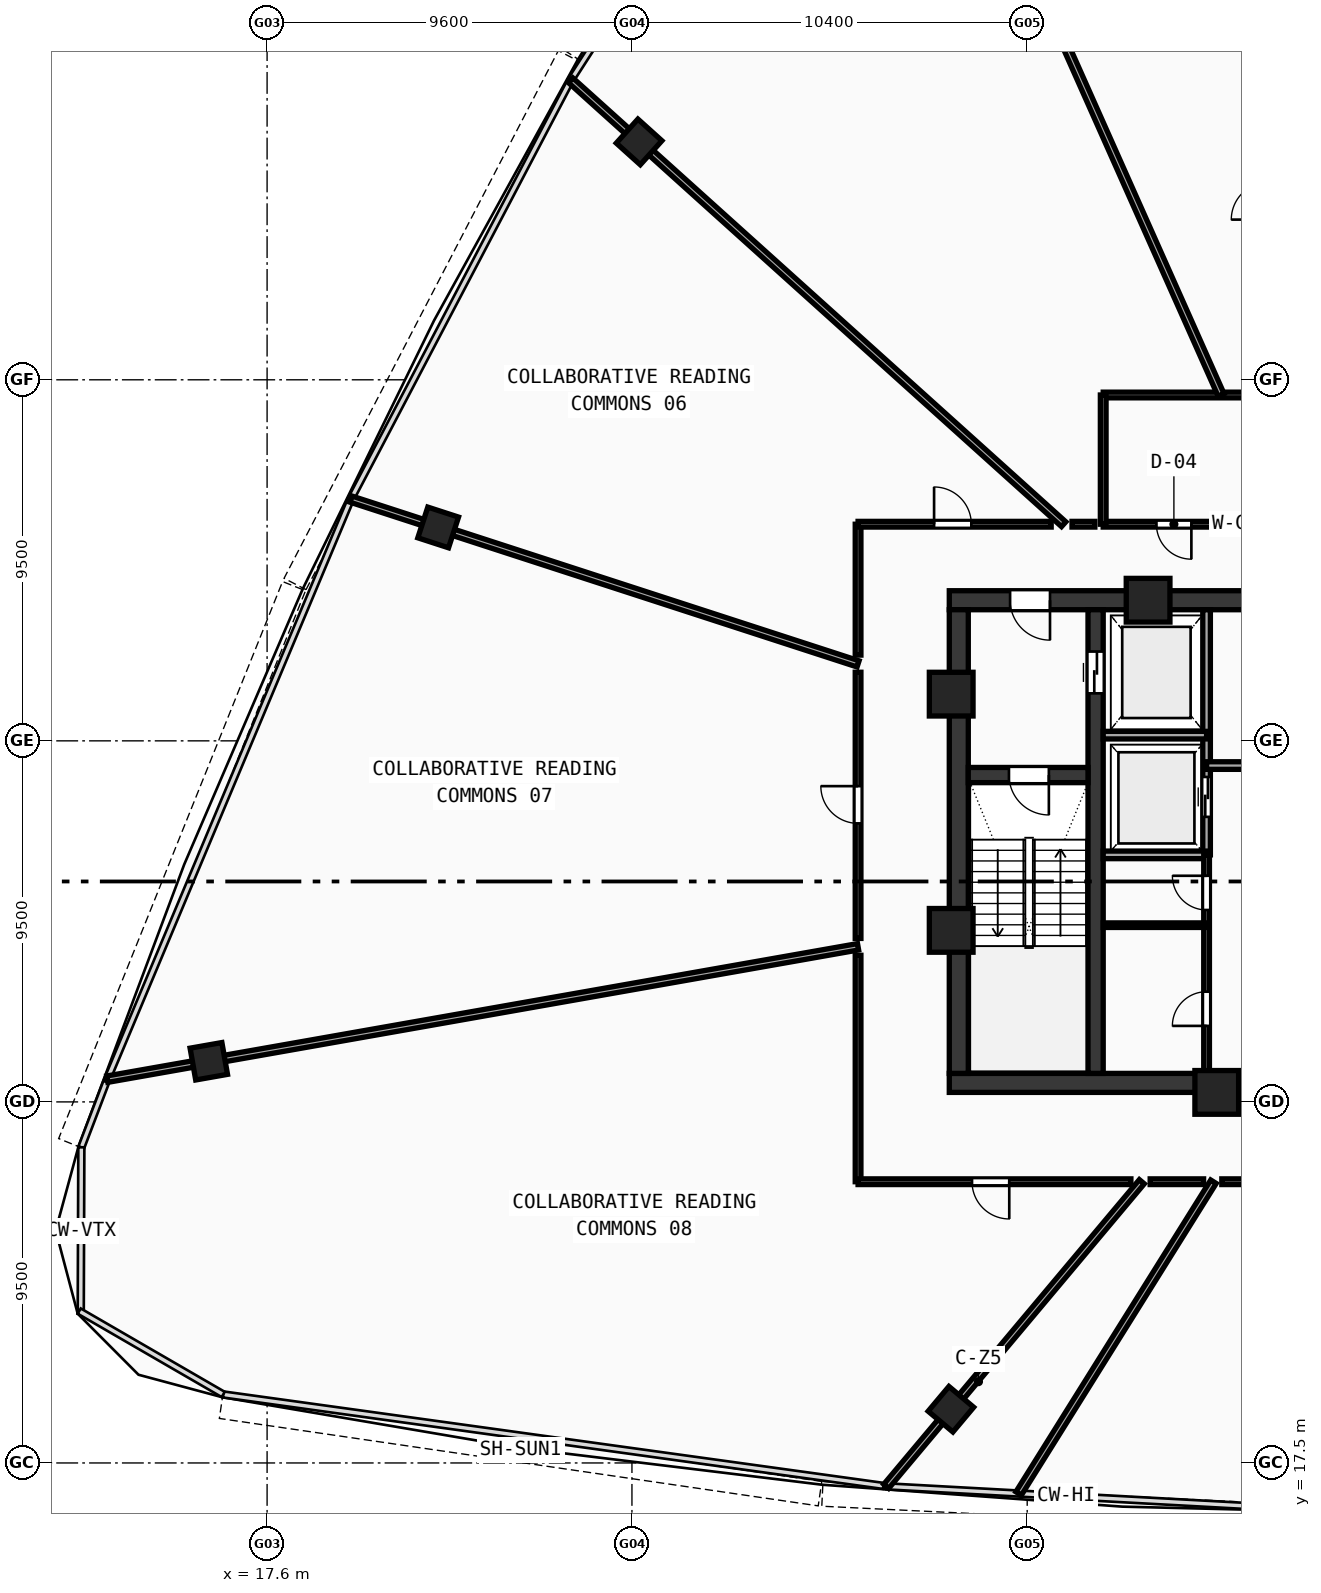
"""IFC4 building model, lengths in metres.
Left out: names, types, materials, properties, quantities, classifications, styles, units other than length and angle.
Written with IfcOpenShell. Run it as: python <this file> out.ifc"""

import sys

from ifc_helpers import new_model, si_unit, direction, frame, frame_2d, origin, origin_with_axes, origin_2d, place, context, subcontext, project, spatial, rectangle, hollow_rectangle, extrude, source, transform, mapped, element, fill, save


model = new_model("IFC4")
c1 = context("Model", 3, precision=1e-05, world=origin(), true_north=direction((0.0, 1.0)))
c2 = subcontext(c1, "Body", "Model", "MODEL_VIEW")
j1 = project(units=[si_unit("LENGTHUNIT", "METRE"), si_unit("PLANEANGLEUNIT", "RADIAN")], contexts=[c1])
p1 = place(None, origin())
s1 = spatial("IfcSite", under=j1, at=p1, CompositionType="ELEMENT")
p2 = place(p1, origin())
s2 = spatial("IfcBuilding", under=s1, at=p2, CompositionType="ELEMENT")
p3 = place(p2, frame((0.0, 0.0, 244.53)))
s3 = spatial("IfcBuildingStorey", under=s2, at=p3, CompositionType="ELEMENT", Elevation=244.53)
p4 = place(p3, frame((35.55, 27.5, 0.0), z_axis=(0.0, 0.0, 1.0), x_axis=(1.0, 0.0, 0.0)))
e1 = element("IfcWall", 1, at=p4, inside=s3, PredefinedType="SHEAR", context=c2, shape_type="SweptSolid", body=[
    extrude(rectangle(XDim=24.9, YDim=0.5, at=frame_2d((12.45, 0.0))), origin(), (0.0, 0.0, 1.0), 3.47),
])
p5 = place(p3, frame((35.55, 40.2, 0.0), z_axis=(0.0, 0.0, 1.0), x_axis=(1.0, 0.0, 0.0)))
e2 = element("IfcWall", 2, at=p5, inside=s3, PredefinedType="SHEAR", context=c2, shape_type="SweptSolid", body=[
    extrude(rectangle(XDim=11.25, YDim=0.5, at=frame_2d((5.625, 0.0))), origin(), (0.0, 0.0, 1.0), 3.47),
])
p6 = place(p5, frame((1.6, 0.0, 0.0)))
e3 = element("IfcOpeningElement", 3, at=p6, cuts=e2, PredefinedType="OPENING", context=c2, shape_type="SweptSolid", body=[
    extrude(rectangle(XDim=1.05, YDim=2.1, at=frame_2d((0.525, 1.05))), frame((0.0, 0.26, 0.0), z_axis=(0.0, -1.0, 0.0), x_axis=(1.0, 0.0, 0.0)), (0.0, 0.0, 1.0), 0.52),
])
p7 = place(p3, frame((35.8, 27.75, 0.0), z_axis=(0.0, 0.0, 1.0), x_axis=(0.0, 1.0, 0.0)))
e4 = element("IfcWall", 4, at=p7, inside=s3, PredefinedType="SHEAR", context=c2, shape_type="SweptSolid", body=[
    extrude(rectangle(XDim=12.2, YDim=0.5, at=frame_2d((6.1, 0.0))), origin(), (0.0, 0.0, 1.0), 3.47),
])
p8 = place(p3, frame((39.4, 27.75, 0.0), z_axis=(0.0, 0.0, 1.0), x_axis=(0.0, 1.0, 0.0)))
e5 = element("IfcWall", 5, at=p8, inside=s3, PredefinedType="SHEAR", context=c2, shape_type="SweptSolid", body=[
    extrude(rectangle(XDim=12.2, YDim=0.4, at=frame_2d((6.1, 0.0))), origin(), (0.0, 0.0, 1.0), 3.47),
])
p9 = place(p8, frame((10.0, 0.0, 0.0)))
e6 = element("IfcOpeningElement", 6, at=p9, cuts=e5, PredefinedType="OPENING", context=c2, shape_type="SweptSolid", body=[
    extrude(rectangle(XDim=1.1, YDim=2.1, at=frame_2d((0.55, 1.05))), frame((0.0, 0.21, 0.0), z_axis=(0.0, -1.0, 0.0), x_axis=(1.0, 0.0, 0.0)), (0.0, 0.0, 1.0), 0.42),
])
p10 = place(p3, frame((36.05, 35.6, 0.0), z_axis=(0.0, 0.0, 1.0), x_axis=(1.0, 0.0, 0.0)))
e7 = element("IfcWall", 7, at=p10, inside=s3, PredefinedType="SHEAR", context=c2, shape_type="SweptSolid", body=[
    extrude(rectangle(XDim=3.15, YDim=0.4, at=frame_2d((1.575, 0.0))), origin(), (0.0, 0.0, 1.0), 3.47),
])
p11 = place(p10, frame((1.07, 0.0, 0.0)))
e8 = element("IfcOpeningElement", 8, at=p11, cuts=e7, PredefinedType="OPENING", context=c2, shape_type="SweptSolid", body=[
    extrude(rectangle(XDim=1.05, YDim=2.1, at=frame_2d((0.525, 1.05))), frame((0.0, 0.21, 0.0), z_axis=(0.0, -1.0, 0.0), x_axis=(1.0, 0.0, 0.0)), (0.0, 0.0, 1.0), 0.42),
])
m1 = source(origin(), c2, "Body", "SweptSolid", [
    extrude(hollow_rectangle(XDim=1.15, YDim=1.15, WallThickness=0.048, at=origin_2d()), origin(), (0.0, 0.0, 1.0), 3.73),
])
for number, where, z_axis, x_axis in (
    (9, (42.588, 27.25, -0.26), (0.0, 0.0, 1.0), (1.0, 0.0, 0.0)),
    (10, (40.781, 40.2, -0.26), (0.0, 0.0, 1.0), (1.0, 0.0, 0.0)),
    (11, (35.6, 37.729, -0.26), (0.0, 0.0, 1.0), (1.0, 0.0, 0.0)),
    (12, (35.6, 31.513, -0.26), (0.0, 0.0, 1.0), (1.0, 0.0, 0.0)),
):
    element("IfcColumn", number, at=place(p3, frame(where, z_axis=z_axis, x_axis=x_axis)), inside=s3, PredefinedType="COLUMN", context=c2, shape_type="MappedRepresentation", body=[
        mapped(m1, transform((0.0, 0.0, 0.0), scale=1.0)),
    ])
m2 = source(origin(), c2, "Body", "SweptSolid", [
    extrude(hollow_rectangle(XDim=0.85, YDim=0.85, WallThickness=0.034, at=origin_2d()), origin(), (0.0, 0.0, 1.0), 3.73),
])
for number, where, z_axis, x_axis in (
    (13, (35.593, 18.914, -0.26), (0.0, 0.0, 1.0), (0.766, -0.643, 0.0)),
    (14, (27.388, 52.259, -0.26), (0.0, 0.0, 1.0), (-0.669, -0.743, 0.0)),
    (15, (22.102, 42.115, -0.26), (0.0, 0.0, 1.0), (-0.309, -0.951, 0.0)),
    (16, (16.066, 28.069, -0.26), (0.0, 0.0, 1.0), (0.174, -0.985, 0.0)),
):
    element("IfcColumn", number, at=place(p3, frame(where, z_axis=z_axis, x_axis=x_axis)), inside=s3, PredefinedType="COLUMN", context=c2, shape_type="MappedRepresentation", body=[
        mapped(m2, transform((0.0, 0.0, 0.0), scale=1.0)),
    ])
p12 = place(p3, frame((42.32, 33.5, 0.0), z_axis=(0.0, 0.0, 1.0), x_axis=(0.0, 1.0, 0.0)))
e17 = element("IfcWall", 17, at=p12, inside=s3, PredefinedType="SOLIDWALL", context=c2, shape_type="SweptSolid", body=[
    extrude(rectangle(XDim=6.45, YDim=0.2, at=frame_2d((3.225, 0.0))), origin(), (0.0, 0.0, 1.0), 3.47),
])
p13 = place(p12, frame((1.0, 0.0, 0.0)))
e18 = element("IfcOpeningElement", 18, at=p13, cuts=e17, PredefinedType="OPENING", context=c2, shape_type="SweptSolid", body=[
    extrude(rectangle(XDim=1.05, YDim=2.1, at=frame_2d((0.525, 1.05))), frame((0.0, 0.11, 0.0), z_axis=(0.0, -1.0, 0.0), x_axis=(1.0, 0.0, 0.0)), (0.0, 0.0, 1.0), 0.22),
])
for number, where, z_axis, x_axis in (
    (19, (39.6, 36.65, 0.0), (0.0, 0.0, 1.0), (1.0, 0.0, 0.0)),
    (20, (39.6, 33.5, 0.0), (0.0, 0.0, 1.0), (1.0, 0.0, 0.0)),
):
    element("IfcWall", number, at=place(p3, frame(where, z_axis=z_axis, x_axis=x_axis)), inside=s3, PredefinedType="SOLIDWALL", context=c2, shape_type="SweptSolid", body=[
        extrude(rectangle(XDim=2.72, YDim=0.2, at=frame_2d((1.36, 0.0))), origin(), (0.0, 0.0, 1.0), 3.47),
    ])
p14 = place(p3, frame((42.32, 35.85, 0.0), z_axis=(0.0, 0.0, 1.0), x_axis=(1.0, 0.0, 0.0)))
e21 = element("IfcWall", 21, at=p14, inside=s3, PredefinedType="SOLIDWALL", context=c2, shape_type="SweptSolid", body=[
    extrude(rectangle(XDim=4.73, YDim=0.2, at=frame_2d((2.365, 0.0))), origin(), (0.0, 0.0, 1.0), 3.47),
])
p15 = place(p14, frame((1.8, 0.0, 0.0)))
e22 = element("IfcOpeningElement", 22, at=p15, cuts=e21, PredefinedType="OPENING", context=c2, shape_type="SweptSolid", body=[
    extrude(rectangle(XDim=0.9, YDim=2.1, at=frame_2d((0.45, 1.05))), frame((0.0, 0.11, 0.0), z_axis=(0.0, -1.0, 0.0), x_axis=(1.0, 0.0, 0.0)), (0.0, 0.0, 1.0), 0.22),
])
p16 = place(p3, frame((42.32, 27.6, 0.0), z_axis=(0.0, 0.0, 1.0), x_axis=(0.0, 1.0, 0.0)))
e23 = element("IfcWall", 23, at=p16, inside=s3, PredefinedType="PARTITIONING", context=c2, shape_type="SweptSolid", body=[
    extrude(rectangle(XDim=5.9, YDim=0.15, at=frame_2d((2.95, 0.0))), origin(), (0.0, 0.0, 1.0), 3.47),
])
p17 = place(p16, frame((1.4, 0.0, 0.0)))
e24 = element("IfcOpeningElement", 24, at=p17, cuts=e23, PredefinedType="OPENING", context=c2, shape_type="SweptSolid", body=[
    extrude(rectangle(XDim=0.9, YDim=2.1, at=frame_2d((0.45, 1.05))), frame((0.0, 0.085, 0.0), z_axis=(0.0, -1.0, 0.0), x_axis=(1.0, 0.0, 0.0)), (0.0, 0.0, 1.0), 0.17),
])
p18 = place(p16, frame((4.45, 0.0, 0.0)))
e25 = element("IfcOpeningElement", 25, at=p18, cuts=e23, PredefinedType="OPENING", context=c2, shape_type="SweptSolid", body=[
    extrude(rectangle(XDim=0.9, YDim=2.1, at=frame_2d((0.45, 1.05))), frame((0.0, 0.085, 0.0), z_axis=(0.0, -1.0, 0.0), x_axis=(1.0, 0.0, 0.0)), (0.0, 0.0, 1.0), 0.17),
])
p19 = place(p3, frame((39.6, 31.65, 0.0), z_axis=(0.0, 0.0, 1.0), x_axis=(1.0, 0.0, 0.0)))
e26 = element("IfcWall", 26, at=p19, inside=s3, PredefinedType="PARTITIONING", context=c2, shape_type="SweptSolid", body=[
    extrude(rectangle(XDim=2.72, YDim=0.12, at=frame_2d((1.36, 0.0))), origin(), (0.0, 0.0, 1.0), 3.47),
])
p20 = place(p3, frame((39.6, 42.2, 0.0), z_axis=(0.0, 0.0, 1.0), x_axis=(1.0, 0.0, 0.0)))
e27 = element("IfcWall", 27, at=p20, inside=s3, PredefinedType="PARTITIONING", context=c2, shape_type="SweptSolid", body=[
    extrude(rectangle(XDim=4.35, YDim=0.15, at=frame_2d((2.175, 0.0))), origin(), (0.0, 0.0, 1.0), 3.47),
])
p21 = place(p20, frame((1.4, 0.0, 0.0)))
e28 = element("IfcOpeningElement", 28, at=p21, cuts=e27, PredefinedType="OPENING", context=c2, shape_type="SweptSolid", body=[
    extrude(rectangle(XDim=0.92, YDim=2.1, at=frame_2d((0.46, 1.05))), frame((0.0, 0.085, 0.0), z_axis=(0.0, -1.0, 0.0), x_axis=(1.0, 0.0, 0.0)), (0.0, 0.0, 1.0), 0.17),
])
p22 = place(p3, frame((39.6, 45.6, 0.0), z_axis=(0.0, 0.0, 1.0), x_axis=(1.0, 0.0, 0.0)))
e29 = element("IfcWall", 29, at=p22, inside=s3, PredefinedType="PARTITIONING", context=c2, shape_type="SweptSolid", body=[
    extrude(rectangle(XDim=4.35, YDim=0.15, at=frame_2d((2.175, 0.0))), origin(), (0.0, 0.0, 1.0), 2.82),
])
p23 = place(p3, frame((39.6, 42.2, 0.0), z_axis=(0.0, 0.0, 1.0), x_axis=(0.0, 1.0, 0.0)))
e30 = element("IfcWall", 30, at=p23, inside=s3, PredefinedType="PARTITIONING", context=c2, shape_type="SweptSolid", body=[
    extrude(rectangle(XDim=3.4, YDim=0.15, at=frame_2d((1.7, 0.0))), origin(), (0.0, 0.0, 1.0), 3.47),
])
p24 = place(p3, frame((42.702, 45.6, 0.0), z_axis=(0.0, 0.0, 1.0), x_axis=(-0.406745472033, 0.913541526686, 0.0)))
e31 = element("IfcWall", 31, at=p24, inside=s3, PredefinedType="PARTITIONING", context=c2, shape_type="SweptSolid", body=[
    extrude(rectangle(XDim=22.574, YDim=0.17, at=frame_2d((11.287, 0.0))), origin(), (0.0, 0.0, 1.0), 2.82),
])
p25 = place(p3, frame((38.56, 42.2, 0.0), z_axis=(0.0, 0.0, 1.0), x_axis=(-0.743140424774, 0.669135493802, 0.0)))
e32 = element("IfcWall", 32, at=p25, inside=s3, PredefinedType="PARTITIONING", context=c2, shape_type="SweptSolid", body=[
    extrude(rectangle(XDim=17.455, YDim=0.17, at=frame_2d((8.728, 0.0))), origin(), (0.0, 0.0, 1.0), 2.82),
])
p26 = place(p3, frame((33.15, 38.525, 0.0), z_axis=(0.0, 0.0, 1.0), x_axis=(-0.951060404644, 0.309005027011, 0.0)))
e33 = element("IfcWall", 33, at=p26, inside=s3, PredefinedType="PARTITIONING", context=c2, shape_type="SweptSolid", body=[
    extrude(rectangle(XDim=14.032, YDim=0.17, at=frame_2d((7.016, 0.0))), origin(), (0.0, 0.0, 1.0), 2.82),
])
p27 = place(p3, frame((33.15, 31.082, 0.0), z_axis=(0.0, 0.0, 1.0), x_axis=(-0.984808421785, -0.173644384824, 0.0)))
e34 = element("IfcWall", 34, at=p27, inside=s3, PredefinedType="PARTITIONING", context=c2, shape_type="SweptSolid", body=[
    extrude(rectangle(XDim=20.059, YDim=0.17, at=frame_2d((10.03, 0.0))), origin(), (0.0, 0.0, 1.0), 2.82),
])
p28 = place(p3, frame((40.616, 24.9, 0.0), z_axis=(0.0, 0.0, 1.0), x_axis=(-0.642788120563, -0.766044014443, 0.0)))
e35 = element("IfcWall", 35, at=p28, inside=s3, PredefinedType="PARTITIONING", context=c2, shape_type="SweptSolid", body=[
    extrude(rectangle(XDim=10.462, YDim=0.17, at=frame_2d((5.231, 0.0))), origin(), (0.0, 0.0, 1.0), 2.82),
])
p29 = place(p3, frame((42.501, 24.9, 0.0), z_axis=(0.0, 0.0, 1.0), x_axis=(-0.529930889386, -0.848040831844, 0.0)))
e36 = element("IfcWall", 36, at=p29, inside=s3, PredefinedType="PARTITIONING", context=c2, shape_type="SweptSolid", body=[
    extrude(rectangle(XDim=9.675, YDim=0.17, at=frame_2d((4.837, 0.0))), origin(), (0.0, 0.0, 1.0), 2.82),
])
p30 = place(p3, frame((33.15, 24.9, 0.0), z_axis=(0.0, 0.0, 1.0), x_axis=(0.0, 1.0, 0.0)))
e37 = element("IfcWall", 37, at=p30, inside=s3, PredefinedType="PARTITIONING", context=c2, shape_type="SweptSolid", body=[
    extrude(rectangle(XDim=5.958, YDim=0.15, at=frame_2d((2.979, 0.0))), origin(), (0.0, 0.0, 1.0), 3.12),
])
p31 = place(p3, frame((33.15, 31.301, 0.0), z_axis=(0.0, 0.0, 1.0), x_axis=(0.0, 1.0, 0.0)))
e38 = element("IfcWall", 38, at=p31, inside=s3, PredefinedType="PARTITIONING", context=c2, shape_type="SweptSolid", body=[
    extrude(rectangle(XDim=7.004, YDim=0.15, at=frame_2d((3.502, 0.0))), origin(), (0.0, 0.0, 1.0), 3.47),
])
p32 = place(p31, frame((3.027, 0.0, 0.0)))
e39 = element("IfcOpeningElement", 39, at=p32, cuts=e38, PredefinedType="OPENING", context=c2, shape_type="SweptSolid", body=[
    extrude(rectangle(XDim=0.98, YDim=2.12, at=frame_2d((0.49, 1.06))), frame((0.0, 0.085, 0.0), z_axis=(0.0, -1.0, 0.0), x_axis=(1.0, 0.0, 0.0)), (0.0, 0.0, 1.0), 0.17),
])
p33 = place(p3, frame((33.15, 38.756, 0.0), z_axis=(0.0, 0.0, 1.0), x_axis=(0.0, 1.0, 0.0)))
e40 = element("IfcWall", 40, at=p33, inside=s3, PredefinedType="PARTITIONING", context=c2, shape_type="SweptSolid", body=[
    extrude(rectangle(XDim=3.444, YDim=0.15, at=frame_2d((1.722, 0.0))), origin(), (0.0, 0.0, 1.0), 3.12),
])
p34 = place(p3, frame((33.15, 42.2, 0.0), z_axis=(0.0, 0.0, 1.0), x_axis=(1.0, 0.0, 0.0)))
e41 = element("IfcWall", 41, at=p34, inside=s3, PredefinedType="PARTITIONING", context=c2, shape_type="SweptSolid", body=[
    extrude(rectangle(XDim=5.081, YDim=0.15, at=frame_2d((2.541, 0.0))), origin(), (0.0, 0.0, 1.0), 3.12),
])
p35 = place(p34, frame((2.0, 0.0, 0.0)))
e42 = element("IfcOpeningElement", 42, at=p35, cuts=e41, PredefinedType="OPENING", context=c2, shape_type="SweptSolid", body=[
    extrude(rectangle(XDim=0.98, YDim=2.12, at=frame_2d((0.49, 1.06))), frame((0.0, 0.085, 0.0), z_axis=(0.0, -1.0, 0.0), x_axis=(1.0, 0.0, 0.0)), (0.0, 0.0, 1.0), 0.17),
])
p36 = place(p3, frame((38.78, 42.2, 0.0), z_axis=(0.0, 0.0, 1.0), x_axis=(1.0, 0.0, 0.0)))
e43 = element("IfcWall", 43, at=p36, inside=s3, PredefinedType="PARTITIONING", context=c2, shape_type="SweptSolid", body=[
    extrude(rectangle(XDim=0.6, YDim=0.15, at=frame_2d((0.3, 0.0))), origin(), (0.0, 0.0, 1.0), 2.82),
])
p37 = place(p3, frame((50.138, 24.9, 0.0), z_axis=(0.0, 0.0, 1.0), x_axis=(-1.0, 0.0, 0.0)))
e44 = element("IfcWall", 44, at=p37, inside=s3, PredefinedType="PARTITIONING", context=c2, shape_type="SweptSolid", body=[
    extrude(rectangle(XDim=7.417, YDim=0.15, at=frame_2d((3.708, 0.0))), origin(), (0.0, 0.0, 1.0), 2.82),
])
p38 = place(p37, frame((3.234, 0.0, 0.0)))
e45 = element("IfcOpeningElement", 45, at=p38, cuts=e44, PredefinedType="OPENING", context=c2, shape_type="SweptSolid", body=[
    extrude(rectangle(XDim=0.98, YDim=2.12, at=frame_2d((0.49, 1.06))), frame((0.0, 0.085, 0.0), z_axis=(0.0, -1.0, 0.0), x_axis=(1.0, 0.0, 0.0)), (0.0, 0.0, 1.0), 0.17),
])
p39 = place(p3, frame((42.242, 24.9, 0.0), z_axis=(0.0, 0.0, 1.0), x_axis=(-1.0, 0.0, 0.0)))
e46 = element("IfcWall", 46, at=p39, inside=s3, PredefinedType="PARTITIONING", context=c2, shape_type="SweptSolid", body=[
    extrude(rectangle(XDim=1.406, YDim=0.15, at=frame_2d((0.703, 0.0))), origin(), (0.0, 0.0, 1.0), 2.82),
])
p40 = place(p3, frame((40.329, 24.9, 0.0), z_axis=(0.0, 0.0, 1.0), x_axis=(-1.0, 0.0, 0.0)))
e47 = element("IfcWall", 47, at=p40, inside=s3, PredefinedType="PARTITIONING", context=c2, shape_type="SweptSolid", body=[
    extrude(rectangle(XDim=7.179, YDim=0.15, at=frame_2d((3.589, 0.0))), origin(), (0.0, 0.0, 1.0), 3.12),
])
p41 = place(p40, frame((3.201, 0.0, 0.0)))
e48 = element("IfcOpeningElement", 48, at=p41, cuts=e47, PredefinedType="OPENING", context=c2, shape_type="SweptSolid", body=[
    extrude(rectangle(XDim=0.98, YDim=2.12, at=frame_2d((0.49, 1.06))), frame((0.0, 0.085, 0.0), z_axis=(0.0, -1.0, 0.0), x_axis=(1.0, 0.0, 0.0)), (0.0, 0.0, 1.0), 0.17),
])
m3 = source(origin(), c2, "Body", "SweptSolid", [
    extrude(rectangle(XDim=1.05, YDim=2.1, at=frame_2d((0.525, 1.05))), frame((0.0, 0.025, 0.0), z_axis=(0.0, -1.0, 0.0), x_axis=(1.0, 0.0, 0.0)), (0.0, 0.0, 1.0), 0.05),
])
p42 = place(p11, frame((1.05, 0.0, 0.0), z_axis=(0.0, 0.0, 1.0), x_axis=(-1.0, 0.0, 0.0)))
e49 = element("IfcDoor", 49, at=p42, inside=s3, OperationType="SINGLE_SWING_LEFT", PredefinedType="DOOR", context=c2, shape_type="MappedRepresentation", body=[
    mapped(m3, transform((0.0, 0.0, 0.0), scale=1.0)),
])
fill(e8, e49)
p43 = place(p6, frame((1.05, 0.0, 0.0), z_axis=(0.0, 0.0, 1.0), x_axis=(-1.0, 0.0, 0.0)))
e50 = element("IfcDoor", 50, at=p43, inside=s3, OperationType="SINGLE_SWING_LEFT", PredefinedType="DOOR", context=c2, shape_type="MappedRepresentation", body=[
    mapped(m3, transform((0.0, 0.0, 0.0), scale=1.0)),
])
fill(e3, e50)
m4 = source(origin(), c2, "Body", "SweptSolid", [
    extrude(rectangle(XDim=1.1, YDim=2.1, at=frame_2d((0.55, 1.05))), frame((0.0, 0.025, 0.0), z_axis=(0.0, -1.0, 0.0), x_axis=(1.0, 0.0, 0.0)), (0.0, 0.0, 1.0), 0.05),
])
p44 = place(p9, frame((1.1, 0.0, 0.0), z_axis=(0.0, 0.0, 1.0), x_axis=(-1.0, 0.0, 0.0)))
e51 = element("IfcDoor", 51, at=p44, inside=s3, OperationType="DOUBLE_DOOR_SLIDING", PredefinedType="DOOR", context=c2, shape_type="MappedRepresentation", body=[
    mapped(m4, transform((0.0, 0.0, 0.0), scale=1.0)),
])
fill(e6, e51)
p45 = place(p13, origin_with_axes())
e52 = element("IfcDoor", 52, at=p45, inside=s3, OperationType="DOUBLE_DOOR_SLIDING", PredefinedType="DOOR", context=c2, shape_type="MappedRepresentation", body=[
    mapped(m3, transform((0.0, 0.0, 0.0), scale=1.0)),
])
fill(e18, e52)
m5 = source(origin(), c2, "Body", "SweptSolid", [
    extrude(rectangle(XDim=0.9, YDim=2.1, at=frame_2d((0.45, 1.05))), frame((0.0, 0.025, 0.0), z_axis=(0.0, -1.0, 0.0), x_axis=(1.0, 0.0, 0.0)), (0.0, 0.0, 1.0), 0.05),
])
p46 = place(p17, origin_with_axes())
e53 = element("IfcDoor", 53, at=p46, inside=s3, OperationType="SINGLE_SWING_LEFT", PredefinedType="DOOR", context=c2, shape_type="MappedRepresentation", body=[
    mapped(m5, transform((0.0, 0.0, 0.0), scale=1.0)),
])
fill(e24, e53)
p47 = place(p18, origin_with_axes())
e54 = element("IfcDoor", 54, at=p47, inside=s3, OperationType="SINGLE_SWING_RIGHT", PredefinedType="DOOR", context=c2, shape_type="MappedRepresentation", body=[
    mapped(m5, transform((0.0, 0.0, 0.0), scale=1.0)),
])
fill(e25, e54)
m6 = source(origin(), c2, "Body", "SweptSolid", [
    extrude(rectangle(XDim=0.92, YDim=2.1, at=frame_2d((0.46, 1.05))), frame((0.0, 0.025, 0.0), z_axis=(0.0, -1.0, 0.0), x_axis=(1.0, 0.0, 0.0)), (0.0, 0.0, 1.0), 0.05),
])
p48 = place(p21, frame((0.92, 0.0, 0.0), z_axis=(0.0, 0.0, 1.0), x_axis=(-1.0, 0.0, 0.0)))
e55 = element("IfcDoor", 55, at=p48, inside=s3, OperationType="SINGLE_SWING_LEFT", PredefinedType="DOOR", context=c2, shape_type="MappedRepresentation", body=[
    mapped(m6, transform((0.0, 0.0, 0.0), scale=1.0)),
])
fill(e28, e55)
m7 = source(origin(), c2, "Body", "SweptSolid", [
    extrude(rectangle(XDim=0.98, YDim=2.12, at=frame_2d((0.49, 1.06))), frame((0.0, 0.025, 0.0), z_axis=(0.0, -1.0, 0.0), x_axis=(1.0, 0.0, 0.0)), (0.0, 0.0, 1.0), 0.05),
])
p49 = place(p35, origin_with_axes())
e56 = element("IfcDoor", 56, at=p49, inside=s3, OperationType="SINGLE_SWING_LEFT", PredefinedType="DOOR", context=c2, shape_type="MappedRepresentation", body=[
    mapped(m7, transform((0.0, 0.0, 0.0), scale=1.0)),
])
fill(e42, e56)
p50 = place(p32, origin_with_axes())
e57 = element("IfcDoor", 57, at=p50, inside=s3, OperationType="SINGLE_SWING_RIGHT", PredefinedType="DOOR", context=c2, shape_type="MappedRepresentation", body=[
    mapped(m7, transform((0.0, 0.0, 0.0), scale=1.0)),
])
fill(e39, e57)
p51 = place(p41, origin_with_axes())
e58 = element("IfcDoor", 58, at=p51, inside=s3, OperationType="SINGLE_SWING_LEFT", PredefinedType="DOOR", context=c2, shape_type="MappedRepresentation", body=[
    mapped(m7, transform((0.0, 0.0, 0.0), scale=1.0)),
])
fill(e48, e58)
save(model, sys.argv[1])
